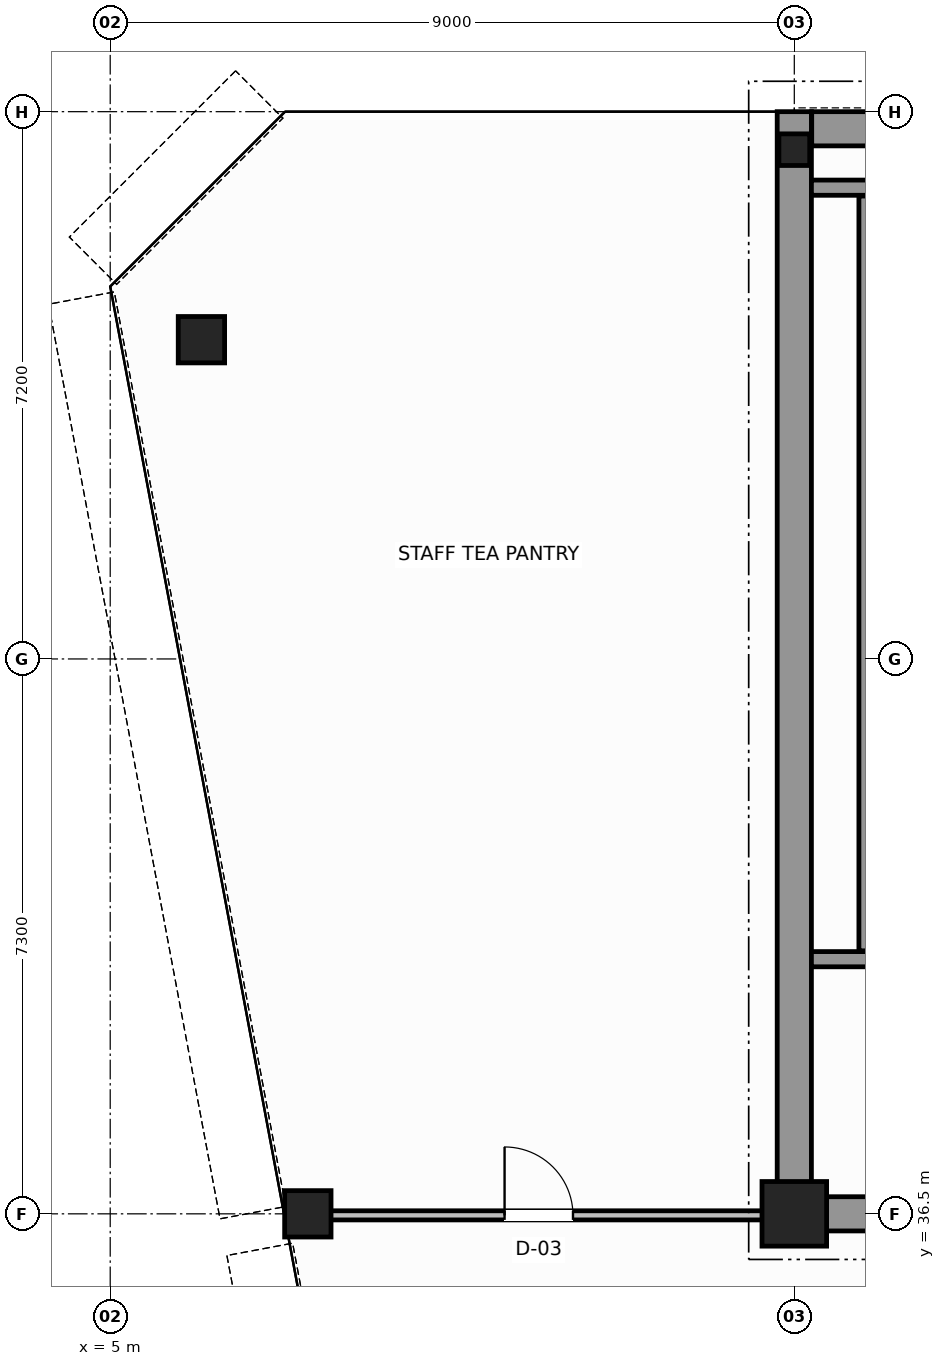
"""IFC4 building model, lengths in metres.
Left out: names, types, materials, properties, quantities, classifications, styles, units other than length and angle.
Written with IfcOpenShell. Run it as: python <this file> out.ifc"""

import sys

from ifc_helpers import new_model, si_unit, direction, frame, frame_2d, origin, origin_2d, place, context, subcontext, project, spatial, rectangle, hollow_circle, i_section, extrude, source, transform, mapped, element, fill, save


model = new_model("IFC4")
c1 = context("Model", 3, precision=1e-05, world=origin(), true_north=direction((0.0, 1.0)))
c2 = subcontext(c1, "Body", "Model", "MODEL_VIEW")
j1 = project(units=[si_unit("LENGTHUNIT", "METRE"), si_unit("PLANEANGLEUNIT", "RADIAN")], contexts=[c1])
p1 = place(None, origin())
s1 = spatial("IfcSite", under=j1, at=p1, CompositionType="ELEMENT")
p2 = place(p1, origin())
s2 = spatial("IfcBuilding", under=s1, at=p2, CompositionType="ELEMENT")
p3 = place(p2, frame((0.0, 0.0, 272.6)))
s3 = spatial("IfcBuildingStorey", under=s2, at=p3, CompositionType="ELEMENT", Elevation=272.6)
m1 = source(origin(), c2, "Body", "SweptSolid", [
    extrude(rectangle(XDim=0.85, YDim=0.85, at=origin_2d()), origin(), (0.0, 0.0, 1.0), 3.8),
])
p4 = place(p3, frame((14.0, 36.5, 0.0), z_axis=(0.0, 0.0, 1.0), x_axis=(1.0, 0.0, 0.0)))
e1 = element("IfcColumn", 1, at=p4, inside=s3, PredefinedType="COLUMN", context=c2, shape_type="MappedRepresentation", body=[
    mapped(m1, transform((0.0, 0.0, 0.0), scale=1.0)),
])
m2 = source(origin(), c2, "Body", "SweptSolid", [
    extrude(i_section(OverallWidth=0.406, OverallDepth=0.416, WebThickness=0.03, FlangeThickness=0.042, FilletRadius=0.015, at=origin_2d()), origin(), (0.0, 0.0, 1.0), 3.8),
])
p5 = place(p3, frame((14.0, 50.5, 0.0), z_axis=(0.0, 0.0, 1.0), x_axis=(1.0, 0.0, 0.0)))
e2 = element("IfcColumn", 2, at=p5, inside=s3, PredefinedType="COLUMN", context=c2, shape_type="MappedRepresentation", body=[
    mapped(m2, transform((0.0, 0.0, 0.0), scale=1.0)),
])
m3 = source(origin(), c2, "Body", "SweptSolid", [
    extrude(hollow_circle(Radius=0.305, WallThickness=0.03, at=origin_2d()), origin(), (0.0, 0.0, 1.0), 3.8),
])
for number, where, z_axis, x_axis in (
    (3, (6.2, 48.0, 0.0), (0.0, 0.0, 1.0), (1.0, 0.0, 0.0)),
    (4, (7.6, 36.5, 0.0), (0.0, 0.0, 1.0), (1.0, 0.0, 0.0)),
):
    element("IfcColumn", number, at=place(p3, frame(where, z_axis=z_axis, x_axis=x_axis)), inside=s3, PredefinedType="COLUMN", context=c2, shape_type="MappedRepresentation", body=[
        mapped(m3, transform((0.0, 0.0, 0.0), scale=1.0)),
    ])
p6 = place(p3, frame((14.229, 50.775, 0.0), z_axis=(0.0, 0.0, 1.0), x_axis=(1.0, 0.0, 0.0)))
e5 = element("IfcWall", 5, at=p6, inside=s3, PredefinedType="SHEAR", context=c2, shape_type="SweptSolid", body=[
    extrude(rectangle(XDim=19.769, YDim=0.45, at=frame_2d((9.885, 0.0))), origin(), (0.0, 0.0, 1.0), 3.8),
])
p7 = place(p3, frame((14.0, 36.5, 0.0), z_axis=(0.0, 0.0, 1.0), x_axis=(0.0, 1.0, 0.0)))
e6 = element("IfcWall", 6, at=p7, inside=s3, PredefinedType="SHEAR", context=c2, shape_type="SweptSolid", body=[
    extrude(rectangle(XDim=14.5, YDim=0.45, at=frame_2d((7.25, 0.0))), origin(), (0.0, 0.0, 1.0), 3.8),
])
p8 = place(p3, frame((14.245, 36.5, 0.0), z_axis=(0.0, 0.0, 1.0), x_axis=(1.0, 0.0, 0.0)))
e7 = element("IfcWall", 7, at=p8, inside=s3, PredefinedType="SHEAR", context=c2, shape_type="SweptSolid", body=[
    extrude(rectangle(XDim=3.955, YDim=0.45, at=frame_2d((1.978, 0.0))), origin(), (0.0, 0.0, 1.0), 2.58),
])
p9 = place(p3, frame((14.225, 39.85, 0.0), z_axis=(0.0, 0.0, 1.0), x_axis=(1.0, 0.0, 0.0)))
e8 = element("IfcWall", 8, at=p9, inside=s3, PredefinedType="SOLIDWALL", context=c2, shape_type="SweptSolid", body=[
    extrude(rectangle(XDim=4.375, YDim=0.2, at=frame_2d((2.188, 0.0))), origin(), (0.0, 0.0, 1.0), 3.8),
])
p10 = place(p9, frame((1.95, 0.0, 0.0)))
e9 = element("IfcOpeningElement", 9, at=p10, cuts=e8, PredefinedType="OPENING", context=c2, shape_type="SweptSolid", body=[
    extrude(rectangle(XDim=1.1, YDim=2.15, at=frame_2d((0.55, 1.075))), frame((0.0, 0.11, 0.0), z_axis=(0.0, -1.0, 0.0), x_axis=(1.0, 0.0, 0.0)), (0.0, 0.0, 1.0), 0.22),
])
p11 = place(p3, frame((14.225, 50.0, 0.0), z_axis=(0.0, 0.0, 1.0), x_axis=(1.0, 0.0, 0.0)))
e10 = element("IfcWall", 10, at=p11, inside=s3, PredefinedType="SOLIDWALL", context=c2, shape_type="SweptSolid", body=[
    extrude(rectangle(XDim=4.375, YDim=0.2, at=frame_2d((2.188, 0.0))), origin(), (0.0, 0.0, 1.0), 3.8),
])
p12 = place(p3, frame((14.95, 39.96, 0.0), z_axis=(0.0, 0.0, 1.0), x_axis=(0.0, 1.0, 0.0)))
e11 = element("IfcWall", 11, at=p12, inside=s3, PredefinedType="SOLIDWALL", context=c2, shape_type="SweptSolid", body=[
    extrude(rectangle(XDim=9.93, YDim=0.2, at=frame_2d((4.965, 0.0))), origin(), (0.0, 0.0, 1.0), 3.8),
])
p13 = place(p3, frame((7.336, 36.48, 0.0), z_axis=(0.0, 0.0, 1.0), x_axis=(1.0, 0.0, 0.0)))
e12 = element("IfcWall", 12, at=p13, inside=s3, PredefinedType="PARTITIONING", context=c2, shape_type="SweptSolid", body=[
    extrude(rectangle(XDim=6.604, YDim=0.12, at=frame_2d((3.302, 0.0))), origin(), (0.0, 0.0, 1.0), 3.02),
])
p14 = place(p13, frame((2.852, 0.0, 0.0)))
e13 = element("IfcOpeningElement", 13, at=p14, cuts=e12, PredefinedType="OPENING", context=c2, shape_type="SweptSolid", body=[
    extrude(rectangle(XDim=0.9, YDim=2.15, at=frame_2d((0.45, 1.075))), frame((0.0, 0.07, 0.0), z_axis=(0.0, -1.0, 0.0), x_axis=(1.0, 0.0, 0.0)), (0.0, 0.0, 1.0), 0.14),
])
m4 = source(origin(), c2, "Body", "SweptSolid", [
    extrude(rectangle(XDim=0.9, YDim=2.15, at=frame_2d((0.45, 1.075))), frame((0.0, 0.025, 0.0), z_axis=(0.0, -1.0, 0.0), x_axis=(1.0, 0.0, 0.0)), (0.0, 0.0, 1.0), 0.05),
])
p15 = place(p14, origin())
e14 = element("IfcDoor", 14, at=p15, inside=s3, OperationType="SINGLE_SWING_LEFT", PredefinedType="DOOR", context=c2, shape_type="MappedRepresentation", body=[
    mapped(m4, transform((0.0, 0.0, 0.0), scale=1.0)),
])
fill(e13, e14)
save(model, sys.argv[1])
